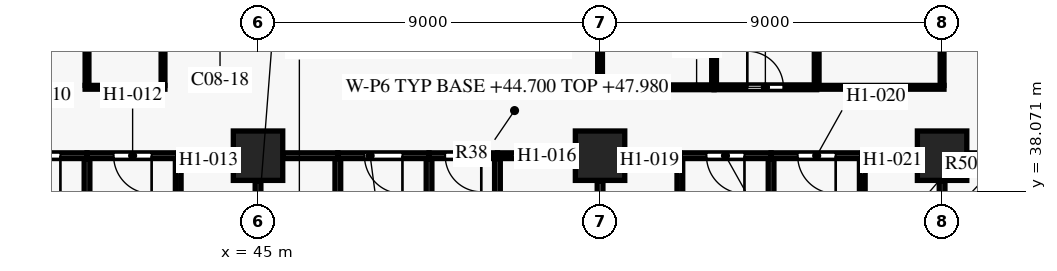
"""IFC4 building model, lengths in metres.
Left out: names, types, materials, properties, quantities, classifications, styles, units other than length and angle.
Written with IfcOpenShell. Run it as: python <this file> out.ifc"""

import sys

from ifc_helpers import new_model, si_unit, direction, frame, frame_2d, origin, origin_2d, place, context, subcontext, project, spatial, rectangle, extrude, element, fill, save


model = new_model("IFC4")
c1 = context("Model", 3, precision=1e-05, world=origin(), true_north=direction((0.0, 1.0)))
c2 = subcontext(c1, "Body", "Model", "MODEL_VIEW")
j1 = project(units=[si_unit("LENGTHUNIT", "METRE"), si_unit("PLANEANGLEUNIT", "RADIAN")], contexts=[c1])
p1 = place(None, origin())
s1 = spatial("IfcSite", under=j1, at=p1, CompositionType="ELEMENT")
p2 = place(p1, origin())
s2 = spatial("IfcBuilding", under=s1, at=p2, CompositionType="ELEMENT")
p3 = place(p2, frame((0.0, 0.0, 44.7)))
s3 = spatial("IfcBuildingStorey", under=s2, at=p3, CompositionType="ELEMENT", Elevation=44.7)
for number, where, z_axis, x_axis in (
    (1, (45.0, 39.0, 0.0), (0.0, 0.0, 1.0), (1.0, 0.0, 0.0)),
    (2, (54.0, 39.0, 0.0), (0.0, 0.0, 1.0), (1.0, 0.0, 0.0)),
    (3, (63.0, 39.0, 0.0), (0.0, 0.0, 1.0), (1.0, 0.0, 0.0)),
):
    element("IfcColumn", number, at=place(p3, frame(where, z_axis=z_axis, x_axis=x_axis)), inside=s3, PredefinedType="COLUMN", context=c2, shape_type="SweptSolid", body=[
        extrude(rectangle(XDim=1.3, YDim=1.3, at=origin_2d()), origin(), (0.0, 0.0, 1.0), 3.6),
    ])
p4 = place(p3, frame((47.1, 36.075, 0.0), z_axis=(0.0, 0.0, 1.0), x_axis=(0.0, 1.0, 0.0)))
e4 = element("IfcWall", 4, at=p4, inside=s3, PredefinedType="PARTITIONING", context=c2, shape_type="SweptSolid", body=[
    extrude(rectangle(XDim=2.85, YDim=0.15, at=frame_2d((1.425, 0.0))), origin(), (0.0, 0.0, 1.0), 2.58),
])
p5 = place(p4, frame((1.025, 0.0, 0.0)))
e5 = element("IfcOpeningElement", 5, at=p5, cuts=e4, PredefinedType="OPENING", context=c2, shape_type="SweptSolid", body=[
    extrude(rectangle(XDim=0.8, YDim=2.1, at=frame_2d((0.4, 1.05))), frame((0.0, 0.085, 0.0), z_axis=(0.0, -1.0, 0.0), x_axis=(1.0, 0.0, 0.0)), (0.0, 0.0, 1.0), 0.17),
])
p6 = place(p3, frame((56.1, 36.075, 0.0), z_axis=(0.0, 0.0, 1.0), x_axis=(0.0, 1.0, 0.0)))
e6 = element("IfcWall", 6, at=p6, inside=s3, PredefinedType="PARTITIONING", context=c2, shape_type="SweptSolid", body=[
    extrude(rectangle(XDim=2.85, YDim=0.15, at=frame_2d((1.425, 0.0))), origin(), (0.0, 0.0, 1.0), 2.58),
])
p7 = place(p6, frame((1.025, 0.0, 0.0)))
e7 = element("IfcOpeningElement", 7, at=p7, cuts=e6, PredefinedType="OPENING", context=c2, shape_type="SweptSolid", body=[
    extrude(rectangle(XDim=0.8, YDim=2.1, at=frame_2d((0.4, 1.05))), frame((0.0, 0.085, 0.0), z_axis=(0.0, -1.0, 0.0), x_axis=(1.0, 0.0, 0.0)), (0.0, 0.0, 1.0), 0.17),
])
for number, where, z_axis, x_axis in (
    (8, (45.0, 38.345, 0.0), (0.0, 0.0, 1.0), (0.0, -1.0, 0.0)),
    (9, (54.0, 38.345, 0.0), (0.0, 0.0, 1.0), (0.0, -1.0, 0.0)),
    (10, (63.0, 38.345, 0.0), (0.0, 0.0, 1.0), (0.0, -1.0, 0.0)),
):
    element("IfcWall", number, at=place(p3, frame(where, z_axis=z_axis, x_axis=x_axis)), inside=s3, PredefinedType="PARTITIONING", context=c2, shape_type="SweptSolid", body=[
        extrude(rectangle(XDim=2.27, YDim=0.15, at=frame_2d((1.135, 0.0))), origin(), (0.0, 0.0, 1.0), 2.73),
    ])
p8 = place(p3, frame((40.5, 38.925, 0.0), z_axis=(0.0, 0.0, 1.0), x_axis=(0.0, -1.0, 0.0)))
e11 = element("IfcWall", 11, at=p8, inside=s3, PredefinedType="PARTITIONING", context=c2, shape_type="SweptSolid", body=[
    extrude(rectangle(XDim=11.35, YDim=0.15, at=frame_2d((5.675, 0.0))), origin(), (0.0, 0.0, 1.0), 2.58),
])
p9 = place(p3, frame((42.9, 38.925, 0.0), z_axis=(0.0, 0.0, 1.0), x_axis=(0.0, -1.0, 0.0)))
e12 = element("IfcWall", 12, at=p9, inside=s3, PredefinedType="PARTITIONING", context=c2, shape_type="SweptSolid", body=[
    extrude(rectangle(XDim=2.85, YDim=0.15, at=frame_2d((1.425, 0.0))), origin(), (0.0, 0.0, 1.0), 2.58),
])
p10 = place(p9, frame((1.025, 0.0, 0.0)))
e13 = element("IfcOpeningElement", 13, at=p10, cuts=e12, PredefinedType="OPENING", context=c2, shape_type="SweptSolid", body=[
    extrude(rectangle(XDim=0.8, YDim=2.1, at=frame_2d((0.4, 1.05))), frame((0.0, 0.085, 0.0), z_axis=(0.0, -1.0, 0.0), x_axis=(1.0, 0.0, 0.0)), (0.0, 0.0, 1.0), 0.17),
])
p11 = place(p3, frame((49.5, 38.925, 0.0), z_axis=(0.0, 0.0, 1.0), x_axis=(0.0, -1.0, 0.0)))
e14 = element("IfcWall", 14, at=p11, inside=s3, PredefinedType="PARTITIONING", context=c2, shape_type="SweptSolid", body=[
    extrude(rectangle(XDim=11.35, YDim=0.15, at=frame_2d((5.675, 0.0))), origin(), (0.0, 0.0, 1.0), 2.58),
])
p12 = place(p3, frame((51.3, 38.925, 0.0), z_axis=(0.0, 0.0, 1.0), x_axis=(0.0, -1.0, 0.0)))
e15 = element("IfcWall", 15, at=p12, inside=s3, PredefinedType="PARTITIONING", context=c2, shape_type="SweptSolid", body=[
    extrude(rectangle(XDim=2.85, YDim=0.15, at=frame_2d((1.425, 0.0))), origin(), (0.0, 0.0, 1.0), 2.58),
])
p13 = place(p12, frame((0.95, 0.0, 0.0)))
e16 = element("IfcOpeningElement", 16, at=p13, cuts=e15, PredefinedType="OPENING", context=c2, shape_type="SweptSolid", body=[
    extrude(rectangle(XDim=0.95, YDim=2.1, at=frame_2d((0.475, 1.05))), frame((0.0, 0.085, 0.0), z_axis=(0.0, -1.0, 0.0), x_axis=(1.0, 0.0, 0.0)), (0.0, 0.0, 1.0), 0.17),
])
p14 = place(p3, frame((58.5, 38.925, 0.0), z_axis=(0.0, 0.0, 1.0), x_axis=(0.0, -1.0, 0.0)))
e17 = element("IfcWall", 17, at=p14, inside=s3, PredefinedType="PARTITIONING", context=c2, shape_type="SweptSolid", body=[
    extrude(rectangle(XDim=11.35, YDim=0.15, at=frame_2d((5.675, 0.0))), origin(), (0.0, 0.0, 1.0), 2.58),
])
p15 = place(p3, frame((60.9, 38.925, 0.0), z_axis=(0.0, 0.0, 1.0), x_axis=(0.0, -1.0, 0.0)))
e18 = element("IfcWall", 18, at=p15, inside=s3, PredefinedType="PARTITIONING", context=c2, shape_type="SweptSolid", body=[
    extrude(rectangle(XDim=2.85, YDim=0.15, at=frame_2d((1.425, 0.0))), origin(), (0.0, 0.0, 1.0), 2.58),
])
p16 = place(p15, frame((1.025, 0.0, 0.0)))
e19 = element("IfcOpeningElement", 19, at=p16, cuts=e18, PredefinedType="OPENING", context=c2, shape_type="SweptSolid", body=[
    extrude(rectangle(XDim=0.8, YDim=2.1, at=frame_2d((0.4, 1.05))), frame((0.0, 0.085, 0.0), z_axis=(0.0, -1.0, 0.0), x_axis=(1.0, 0.0, 0.0)), (0.0, 0.0, 1.0), 0.17),
])
p17 = place(p3, frame((40.5, 39.0, 0.0), z_axis=(0.0, 0.0, 1.0), x_axis=(-1.0, 0.0, 0.0)))
e20 = element("IfcWall", 20, at=p17, inside=s3, PredefinedType="PARTITIONING", context=c2, shape_type="SweptSolid", body=[
    extrude(rectangle(XDim=2.4, YDim=0.15, at=frame_2d((1.2, 0.0))), origin(), (0.0, 0.0, 1.0), 2.58),
])
p18 = place(p17, frame((0.7, 0.0, 0.0)))
e21 = element("IfcOpeningElement", 21, at=p18, cuts=e20, PredefinedType="OPENING", context=c2, shape_type="SweptSolid", body=[
    extrude(rectangle(XDim=1.0, YDim=2.1, at=frame_2d((0.5, 1.05))), frame((0.0, 0.085, 0.0), z_axis=(0.0, -1.0, 0.0), x_axis=(1.0, 0.0, 0.0)), (0.0, 0.0, 1.0), 0.17),
])
p19 = place(p3, frame((42.9, 39.0, 0.0), z_axis=(0.0, 0.0, 1.0), x_axis=(-1.0, 0.0, 0.0)))
e22 = element("IfcWall", 22, at=p19, inside=s3, PredefinedType="PARTITIONING", context=c2, shape_type="SweptSolid", body=[
    extrude(rectangle(XDim=2.4, YDim=0.15, at=frame_2d((1.2, 0.0))), origin(), (0.0, 0.0, 1.0), 2.58),
])
p20 = place(p19, frame((0.7, 0.0, 0.0)))
e23 = element("IfcOpeningElement", 23, at=p20, cuts=e22, PredefinedType="OPENING", context=c2, shape_type="SweptSolid", body=[
    extrude(rectangle(XDim=1.0, YDim=2.1, at=frame_2d((0.5, 1.05))), frame((0.0, 0.085, 0.0), z_axis=(0.0, -1.0, 0.0), x_axis=(1.0, 0.0, 0.0)), (0.0, 0.0, 1.0), 0.17),
])
for number, where, z_axis, x_axis in (
    (24, (44.345, 39.0, 0.0), (0.0, 0.0, 1.0), (-1.0, 0.0, 0.0)),
    (25, (47.1, 39.0, 0.0), (0.0, 0.0, 1.0), (-1.0, 0.0, 0.0)),
):
    element("IfcWall", number, at=place(p3, frame(where, z_axis=z_axis, x_axis=x_axis)), inside=s3, PredefinedType="PARTITIONING", context=c2, shape_type="SweptSolid", body=[
        extrude(rectangle(XDim=1.445, YDim=0.15, at=frame_2d((0.723, 0.0))), origin(), (0.0, 0.0, 1.0), 2.58),
    ])
p21 = place(p3, frame((49.5, 39.0, 0.0), z_axis=(0.0, 0.0, 1.0), x_axis=(-1.0, 0.0, 0.0)))
e26 = element("IfcWall", 26, at=p21, inside=s3, PredefinedType="PARTITIONING", context=c2, shape_type="SweptSolid", body=[
    extrude(rectangle(XDim=2.4, YDim=0.15, at=frame_2d((1.2, 0.0))), origin(), (0.0, 0.0, 1.0), 2.58),
])
p22 = place(p21, frame((0.7, 0.0, 0.0)))
e27 = element("IfcOpeningElement", 27, at=p22, cuts=e26, PredefinedType="OPENING", context=c2, shape_type="SweptSolid", body=[
    extrude(rectangle(XDim=1.0, YDim=2.1, at=frame_2d((0.5, 1.05))), frame((0.0, 0.085, 0.0), z_axis=(0.0, -1.0, 0.0), x_axis=(1.0, 0.0, 0.0)), (0.0, 0.0, 1.0), 0.17),
])
p23 = place(p3, frame((51.3, 39.0, 0.0), z_axis=(0.0, 0.0, 1.0), x_axis=(-1.0, 0.0, 0.0)))
e28 = element("IfcWall", 28, at=p23, inside=s3, PredefinedType="PARTITIONING", context=c2, shape_type="SweptSolid", body=[
    extrude(rectangle(XDim=1.8, YDim=0.15, at=frame_2d((0.9, 0.0))), origin(), (0.0, 0.0, 1.0), 2.58),
])
p24 = place(p23, frame((0.425, 0.0, 0.0)))
e29 = element("IfcOpeningElement", 29, at=p24, cuts=e28, PredefinedType="OPENING", context=c2, shape_type="SweptSolid", body=[
    extrude(rectangle(XDim=0.95, YDim=2.1, at=frame_2d((0.475, 1.05))), frame((0.0, 0.085, 0.0), z_axis=(0.0, -1.0, 0.0), x_axis=(1.0, 0.0, 0.0)), (0.0, 0.0, 1.0), 0.17),
])
p25 = place(p3, frame((53.345, 39.0, 0.0), z_axis=(0.0, 0.0, 1.0), x_axis=(-1.0, 0.0, 0.0)))
e30 = element("IfcWall", 30, at=p25, inside=s3, PredefinedType="PARTITIONING", context=c2, shape_type="SweptSolid", body=[
    extrude(rectangle(XDim=2.045, YDim=0.15, at=frame_2d((1.022, 0.0))), origin(), (0.0, 0.0, 1.0), 2.58),
])
p26 = place(p3, frame((56.1, 39.0, 0.0), z_axis=(0.0, 0.0, 1.0), x_axis=(-1.0, 0.0, 0.0)))
e31 = element("IfcWall", 31, at=p26, inside=s3, PredefinedType="PARTITIONING", context=c2, shape_type="SweptSolid", body=[
    extrude(rectangle(XDim=1.445, YDim=0.15, at=frame_2d((0.723, 0.0))), origin(), (0.0, 0.0, 1.0), 2.58),
])
p27 = place(p3, frame((58.5, 39.0, 0.0), z_axis=(0.0, 0.0, 1.0), x_axis=(-1.0, 0.0, 0.0)))
e32 = element("IfcWall", 32, at=p27, inside=s3, PredefinedType="PARTITIONING", context=c2, shape_type="SweptSolid", body=[
    extrude(rectangle(XDim=2.4, YDim=0.15, at=frame_2d((1.2, 0.0))), origin(), (0.0, 0.0, 1.0), 2.58),
])
p28 = place(p27, frame((0.7, 0.0, 0.0)))
e33 = element("IfcOpeningElement", 33, at=p28, cuts=e32, PredefinedType="OPENING", context=c2, shape_type="SweptSolid", body=[
    extrude(rectangle(XDim=1.0, YDim=2.1, at=frame_2d((0.5, 1.05))), frame((0.0, 0.085, 0.0), z_axis=(0.0, -1.0, 0.0), x_axis=(1.0, 0.0, 0.0)), (0.0, 0.0, 1.0), 0.17),
])
p29 = place(p3, frame((60.9, 39.0, 0.0), z_axis=(0.0, 0.0, 1.0), x_axis=(-1.0, 0.0, 0.0)))
e34 = element("IfcWall", 34, at=p29, inside=s3, PredefinedType="PARTITIONING", context=c2, shape_type="SweptSolid", body=[
    extrude(rectangle(XDim=2.4, YDim=0.15, at=frame_2d((1.2, 0.0))), origin(), (0.0, 0.0, 1.0), 2.58),
])
p30 = place(p29, frame((0.7, 0.0, 0.0)))
e35 = element("IfcOpeningElement", 35, at=p30, cuts=e34, PredefinedType="OPENING", context=c2, shape_type="SweptSolid", body=[
    extrude(rectangle(XDim=1.0, YDim=2.1, at=frame_2d((0.5, 1.05))), frame((0.0, 0.085, 0.0), z_axis=(0.0, -1.0, 0.0), x_axis=(1.0, 0.0, 0.0)), (0.0, 0.0, 1.0), 0.17),
])
p31 = place(p3, frame((62.345, 39.0, 0.0), z_axis=(0.0, 0.0, 1.0), x_axis=(-1.0, 0.0, 0.0)))
e36 = element("IfcWall", 36, at=p31, inside=s3, PredefinedType="PARTITIONING", context=c2, shape_type="SweptSolid", body=[
    extrude(rectangle(XDim=1.445, YDim=0.15, at=frame_2d((0.723, 0.0))), origin(), (0.0, 0.0, 1.0), 2.58),
])
p32 = place(p3, frame((64.875, 39.0, 0.0), z_axis=(0.0, 0.0, 1.0), x_axis=(-1.0, 0.0, 0.0)))
e37 = element("IfcWall", 37, at=p32, inside=s3, PredefinedType="PARTITIONING", context=c2, shape_type="SweptSolid", body=[
    extrude(rectangle(XDim=1.22, YDim=0.15, at=frame_2d((0.61, 0.0))), origin(), (0.0, 0.0, 1.0), 2.58),
])
p33 = place(p3, frame((40.45, 40.8, 0.0), z_axis=(0.0, 0.0, 1.0), x_axis=(1.0, 0.0, 0.0)))
e38 = element("IfcWall", 38, at=p33, inside=s3, PredefinedType="PARTITIONING", context=c2, shape_type="SweptSolid", body=[
    extrude(rectangle(XDim=2.1, YDim=0.1, at=frame_2d((1.05, 0.0))), origin(), (0.0, 0.0, 1.0), 3.28),
])
p34 = place(p3, frame((53.938, 40.8, 0.0), z_axis=(0.0, 0.0, 1.0), x_axis=(1.0, 0.0, 0.0)))
e39 = element("IfcWall", 39, at=p34, inside=s3, PredefinedType="PARTITIONING", context=c2, shape_type="SweptSolid", body=[
    extrude(rectangle(XDim=3.062, YDim=0.125, at=frame_2d((1.531, 0.0))), origin(), (0.0, 0.0, 1.0), 2.73),
])
p35 = place(p3, frame((57.0, 40.8, 0.0), z_axis=(0.0, 0.0, 1.0), x_axis=(1.0, 0.0, 0.0)))
e40 = element("IfcWall", 40, at=p35, inside=s3, PredefinedType="PARTITIONING", context=c2, shape_type="SweptSolid", body=[
    extrude(rectangle(XDim=2.7, YDim=0.125, at=frame_2d((1.35, 0.0))), origin(), (0.0, 0.0, 1.0), 3.28),
])
p36 = place(p35, frame((0.875, 0.0, 0.0)))
e41 = element("IfcOpeningElement", 41, at=p36, cuts=e40, PredefinedType="OPENING", context=c2, shape_type="SweptSolid", body=[
    extrude(rectangle(XDim=0.95, YDim=2.1, at=frame_2d((0.475, 1.05))), frame((0.0, 0.073, 0.0), z_axis=(0.0, -1.0, 0.0), x_axis=(1.0, 0.0, 0.0)), (0.0, 0.0, 1.0), 0.145),
])
p37 = place(p3, frame((59.7, 40.8, 0.0), z_axis=(0.0, 0.0, 1.0), x_axis=(1.0, 0.0, 0.0)))
e42 = element("IfcWall", 42, at=p37, inside=s3, PredefinedType="PARTITIONING", context=c2, shape_type="SweptSolid", body=[
    extrude(rectangle(XDim=3.35, YDim=0.1, at=frame_2d((1.675, 0.0))), origin(), (0.0, 0.0, 1.0), 2.73),
])
p38 = place(p3, frame((63.0, 40.85, 0.0), z_axis=(0.0, 0.0, 1.0), x_axis=(0.0, 1.0, 0.0)))
e43 = element("IfcWall", 43, at=p38, inside=s3, PredefinedType="PARTITIONING", context=c2, shape_type="SweptSolid", body=[
    extrude(rectangle(XDim=8.3, YDim=0.1, at=frame_2d((4.15, 0.0))), origin(), (0.0, 0.0, 1.0), 2.73),
])
p39 = place(p3, frame((54.0, 49.137, 0.0), z_axis=(0.0, 0.0, 1.0), x_axis=(0.0, -1.0, 0.0)))
e44 = element("IfcWall", 44, at=p39, inside=s3, PredefinedType="PARTITIONING", context=c2, shape_type="SweptSolid", body=[
    extrude(rectangle(XDim=8.275, YDim=0.125, at=frame_2d((4.137, 0.0))), origin(), (0.0, 0.0, 1.0), 2.73),
])
for number, where, z_axis, x_axis in (
    (45, (57.0, 49.137, 0.0), (0.0, 0.0, 1.0), (0.0, -1.0, 0.0)),
    (46, (59.7, 49.137, 0.0), (0.0, 0.0, 1.0), (0.0, -1.0, 0.0)),
):
    element("IfcWall", number, at=place(p3, frame(where, z_axis=z_axis, x_axis=x_axis)), inside=s3, PredefinedType="PARTITIONING", context=c2, shape_type="SweptSolid", body=[
        extrude(rectangle(XDim=8.275, YDim=0.125, at=frame_2d((4.137, 0.0))), origin(), (0.0, 0.0, 1.0), 3.28),
    ])
for number, where, z_axis, x_axis in (
    (47, (40.5, 49.15, 0.0), (0.0, 0.0, 1.0), (0.0, -1.0, 0.0)),
    (48, (42.5, 49.15, 0.0), (0.0, 0.0, 1.0), (0.0, -1.0, 0.0)),
):
    element("IfcWall", number, at=place(p3, frame(where, z_axis=z_axis, x_axis=x_axis)), inside=s3, PredefinedType="PARTITIONING", context=c2, shape_type="SweptSolid", body=[
        extrude(rectangle(XDim=8.3, YDim=0.1, at=frame_2d((4.15, 0.0))), origin(), (0.0, 0.0, 1.0), 3.28),
    ])
p40 = place(p18, origin())
e49 = element("IfcDoor", 49, at=p40, inside=s3, OperationType="SINGLE_SWING_LEFT", PredefinedType="DOOR", context=c2, shape_type="SweptSolid", body=[
    extrude(rectangle(XDim=1.0, YDim=2.1, at=frame_2d((0.5, 1.05))), frame((0.0, 0.025, 0.0), z_axis=(0.0, -1.0, 0.0), x_axis=(1.0, 0.0, 0.0)), (0.0, 0.0, 1.0), 0.05),
])
fill(e21, e49)
p41 = place(p20, origin())
e50 = element("IfcDoor", 50, at=p41, inside=s3, OperationType="SINGLE_SWING_LEFT", PredefinedType="DOOR", context=c2, shape_type="SweptSolid", body=[
    extrude(rectangle(XDim=1.0, YDim=2.1, at=frame_2d((0.5, 1.05))), frame((0.0, 0.025, 0.0), z_axis=(0.0, -1.0, 0.0), x_axis=(1.0, 0.0, 0.0)), (0.0, 0.0, 1.0), 0.05),
])
fill(e23, e50)
p42 = place(p22, origin())
e51 = element("IfcDoor", 51, at=p42, inside=s3, OperationType="SINGLE_SWING_LEFT", PredefinedType="DOOR", context=c2, shape_type="SweptSolid", body=[
    extrude(rectangle(XDim=1.0, YDim=2.1, at=frame_2d((0.5, 1.05))), frame((0.0, 0.025, 0.0), z_axis=(0.0, -1.0, 0.0), x_axis=(1.0, 0.0, 0.0)), (0.0, 0.0, 1.0), 0.05),
])
fill(e27, e51)
p43 = place(p24, origin())
e52 = element("IfcDoor", 52, at=p43, inside=s3, OperationType="SINGLE_SWING_LEFT", PredefinedType="DOOR", context=c2, shape_type="SweptSolid", body=[
    extrude(rectangle(XDim=0.95, YDim=2.1, at=frame_2d((0.475, 1.05))), frame((0.0, 0.025, 0.0), z_axis=(0.0, -1.0, 0.0), x_axis=(1.0, 0.0, 0.0)), (0.0, 0.0, 1.0), 0.05),
])
fill(e29, e52)
p44 = place(p28, origin())
e53 = element("IfcDoor", 53, at=p44, inside=s3, OperationType="SINGLE_SWING_LEFT", PredefinedType="DOOR", context=c2, shape_type="SweptSolid", body=[
    extrude(rectangle(XDim=1.0, YDim=2.1, at=frame_2d((0.5, 1.05))), frame((0.0, 0.025, 0.0), z_axis=(0.0, -1.0, 0.0), x_axis=(1.0, 0.0, 0.0)), (0.0, 0.0, 1.0), 0.05),
])
fill(e33, e53)
p45 = place(p30, origin())
e54 = element("IfcDoor", 54, at=p45, inside=s3, OperationType="SINGLE_SWING_LEFT", PredefinedType="DOOR", context=c2, shape_type="SweptSolid", body=[
    extrude(rectangle(XDim=1.0, YDim=2.1, at=frame_2d((0.5, 1.05))), frame((0.0, 0.025, 0.0), z_axis=(0.0, -1.0, 0.0), x_axis=(1.0, 0.0, 0.0)), (0.0, 0.0, 1.0), 0.05),
])
fill(e35, e54)
p46 = place(p36, origin())
e55 = element("IfcDoor", 55, at=p46, inside=s3, OperationType="SINGLE_SWING_LEFT", PredefinedType="DOOR", context=c2, shape_type="SweptSolid", body=[
    extrude(rectangle(XDim=0.95, YDim=2.1, at=frame_2d((0.475, 1.05))), frame((0.0, 0.025, 0.0), z_axis=(0.0, -1.0, 0.0), x_axis=(1.0, 0.0, 0.0)), (0.0, 0.0, 1.0), 0.05),
])
fill(e41, e55)
save(model, sys.argv[1])
